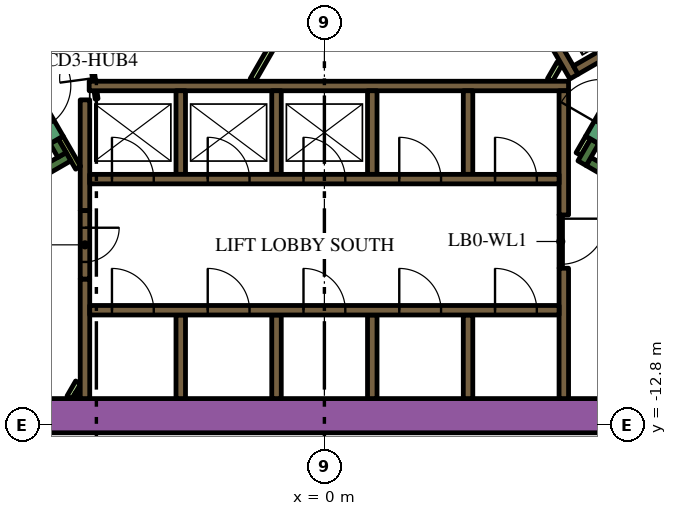
"""IFC4 building model, lengths in metres.
Left out: names, types, materials, properties, quantities, classifications, styles, units other than length and angle.
Written with IfcOpenShell. Run it as: python <this file> out.ifc"""

import sys

from ifc_helpers import new_model, si_unit, direction, frame, frame_2d, origin, place, context, subcontext, project, spatial, polyline, rectangle, outline, extrude, element, fill, save


model = new_model("IFC4")
c1 = context("Model", 3, precision=1e-05, world=origin(), true_north=direction((0.0, 1.0)))
c2 = subcontext(c1, "Body", "Model", "MODEL_VIEW")
j1 = project(units=[si_unit("LENGTHUNIT", "METRE"), si_unit("PLANEANGLEUNIT", "RADIAN")], contexts=[c1])
p1 = place(None, origin())
s1 = spatial("IfcSite", under=j1, at=p1, CompositionType="ELEMENT")
p2 = place(p1, origin())
s2 = spatial("IfcBuilding", under=s1, at=p2, CompositionType="ELEMENT")
p3 = place(p2, frame((0.0, 0.0, 134.4)))
s3 = spatial("IfcBuildingStorey", under=s2, at=p3, CompositionType="ELEMENT", Elevation=134.4)
p4 = place(p3, frame((6.776, 13.364, 0.0), z_axis=(0.0, 0.0, 1.0), x_axis=(0.500004177138, -0.8660229921, 0.0)))
e1 = element("IfcWall", 1, at=p4, inside=s3, PredefinedType="SOLIDWALL", context=c2, shape_type="SweptSolid", body=[
    extrude(rectangle(XDim=20.204, YDim=0.9, at=frame_2d((10.102, 0.0))), origin(), (0.0, 0.0, 1.0), 7.2),
])
p5 = place(p3, frame((-12.019, -12.55, 0.0), z_axis=(0.0, 0.0, 1.0), x_axis=(1.0, 0.0, 0.0)))
e2 = element("IfcWall", 2, at=p5, inside=s3, PredefinedType="SOLIDWALL", context=c2, shape_type="SweptSolid", body=[
    extrude(rectangle(XDim=21.63, YDim=0.9, at=frame_2d((10.815, 0.0))), origin(), (0.0, 0.0, 1.0), 7.2),
])
p6 = place(p3, frame((12.84, -9.261, 0.0), z_axis=(0.0, 0.0, 1.0), x_axis=(-0.866013990052, 0.500019768644, 0.0)))
e3 = element("IfcWall", 3, at=p6, inside=s3, PredefinedType="SOLIDWALL", context=c2, shape_type="SweptSolid", body=[
    extrude(rectangle(XDim=6.8, YDim=0.25, at=frame_2d((3.4, 0.0))), origin(), (0.0, 0.0, 1.0), 7.2),
])
p7 = place(p3, frame((7.113, -5.33, 0.0), z_axis=(0.0, 0.0, 1.0), x_axis=(-0.499965889992, -0.866045096311, 0.0)))
e4 = element("IfcWall", 4, at=p7, inside=s3, PredefinedType="SOLIDWALL", context=c2, shape_type="SweptSolid", body=[
    extrude(rectangle(XDim=0.666, YDim=0.25, at=frame_2d((0.333, 0.0))), origin(), (0.0, 0.0, 1.0), 7.2),
])
p8 = place(p3, frame((-12.84, -9.261, 0.0), z_axis=(0.0, 0.0, 1.0), x_axis=(0.866016039709, 0.500016218704, 0.0)))
e5 = element("IfcWall", 5, at=p8, inside=s3, PredefinedType="SOLIDWALL", context=c2, shape_type="SweptSolid", body=[
    extrude(rectangle(XDim=7.05, YDim=0.25, at=frame_2d((3.525, 0.0))), origin(), (0.0, 0.0, 1.0), 7.2),
])
p9 = place(p3, frame((-6.905, -5.69, 0.0), z_axis=(0.0, 0.0, 1.0), x_axis=(-0.499993700073, 0.866029041019, 0.0)))
e6 = element("IfcWall", 6, at=p9, inside=s3, PredefinedType="SOLIDWALL", context=c2, shape_type="SweptSolid", body=[
    extrude(rectangle(XDim=0.416, YDim=0.25, at=frame_2d((0.208, 0.0))), origin(), (0.0, 0.0, 1.0), 7.2),
])
p10 = place(p3, frame((-3.78, -12.1, 0.0), z_axis=(0.0, 0.0, 1.0), x_axis=(0.0, 1.0, 0.0)))
e7 = element("IfcWall", 7, at=p10, inside=s3, PredefinedType="SOLIDWALL", context=c2, shape_type="SweptSolid", body=[
    extrude(rectangle(XDim=2.2, YDim=0.25, at=frame_2d((1.1, 0.0))), origin(), (0.0, 0.0, 1.0), 7.2),
])
p11 = place(p3, frame((-6.3, -12.1, 0.0), z_axis=(0.0, 0.0, 1.0), x_axis=(0.0, 1.0, 0.0)))
e8 = element("IfcWall", 8, at=p11, inside=s3, PredefinedType="SOLIDWALL", context=c2, shape_type="SweptSolid", body=[
    extrude(rectangle(XDim=3.146, YDim=0.25, at=frame_2d((1.573, 0.0))), origin(), (0.0, 0.0, 1.0), 7.2),
])
p12 = place(p3, frame((-6.3, -4.24, 0.0), z_axis=(0.0, 0.0, 1.0), x_axis=(0.0, -1.0, 0.0)))
e9 = element("IfcWall", 9, at=p12, inside=s3, PredefinedType="SOLIDWALL", context=c2, shape_type="SweptSolid", body=[
    extrude(rectangle(XDim=2.914, YDim=0.25, at=frame_2d((1.457, 0.0))), origin(), (0.0, 0.0, 1.0), 7.2),
])
p13 = place(p3, frame((-6.19, -3.875, 0.0), z_axis=(0.0, 0.0, 1.0), x_axis=(1.0, 0.0, 0.0)))
e10 = element("IfcWall", 10, at=p13, inside=s3, PredefinedType="SOLIDWALL", context=c2, shape_type="SweptSolid", body=[
    extrude(rectangle(XDim=12.615, YDim=0.25, at=frame_2d((6.307, 0.0))), origin(), (0.0, 0.0, 1.0), 7.2),
])
p14 = place(p3, frame((6.3, -8.67, 0.0), z_axis=(0.0, 0.0, 1.0), x_axis=(0.0, -1.0, 0.0)))
e11 = element("IfcWall", 11, at=p14, inside=s3, PredefinedType="SOLIDWALL", context=c2, shape_type="SweptSolid", body=[
    extrude(rectangle(XDim=3.43, YDim=0.25, at=frame_2d((1.715, 0.0))), origin(), (0.0, 0.0, 1.0), 7.2),
])
p15 = place(p3, frame((6.3, -7.268, 0.0), z_axis=(0.0, 0.0, 1.0), x_axis=(0.0, 1.0, 0.0)))
e12 = element("IfcWall", 12, at=p15, inside=s3, PredefinedType="SOLIDWALL", context=c2, shape_type="SweptSolid", body=[
    extrude(rectangle(XDim=3.268, YDim=0.25, at=frame_2d((1.634, 0.0))), origin(), (0.0, 0.0, 1.0), 7.2),
])
for number, where, z_axis, x_axis in (
    (13, (3.78, -4.0, 0.0), (0.0, 0.0, 1.0), (0.0, -1.0, 0.0)),
    (14, (1.26, -4.0, 0.0), (0.0, 0.0, 1.0), (0.0, -1.0, 0.0)),
    (15, (-1.26, -4.0, 0.0), (0.0, 0.0, 1.0), (0.0, -1.0, 0.0)),
    (16, (-3.78, -4.0, 0.0), (0.0, 0.0, 1.0), (0.0, -1.0, 0.0)),
    (17, (3.78, -12.1, 0.0), (0.0, 0.0, 1.0), (0.0, 1.0, 0.0)),
    (18, (1.26, -12.1, 0.0), (0.0, 0.0, 1.0), (0.0, 1.0, 0.0)),
    (19, (-1.26, -12.1, 0.0), (0.0, 0.0, 1.0), (0.0, 1.0, 0.0)),
):
    element("IfcWall", number, at=place(p3, frame(where, z_axis=z_axis, x_axis=x_axis)), inside=s3, PredefinedType="SOLIDWALL", context=c2, shape_type="SweptSolid", body=[
        extrude(rectangle(XDim=2.2, YDim=0.25, at=frame_2d((1.1, 0.0))), origin(), (0.0, 0.0, 1.0), 7.2),
    ])
p16 = place(p3, origin())
e20 = element("IfcWall", 20, at=p16, inside=s3, PredefinedType="SOLIDWALL", context=c2, shape_type="SweptSolid", body=[
    extrude(outline(polyline([(0.335, 6.925), (0.335, 6.925), (0.335, 7.075), (0.335, 7.075), (0.335, 7.075), (0.245, 7.075), (0.035, 7.439), (0.252, 7.564), (0.377, 7.348), (1.512, 5.382), (1.637, 5.165), (2.221, 4.153), (2.771, 3.199), (2.896, 2.983), (3.138, 2.564), (4.031, 1.017), (4.156, 0.801), (5.292, -1.165), (5.417, -1.382), (6.073, -2.519), (6.552, -3.348), (6.677, -3.564), (6.46, -3.689), (0.332, 6.925), (0.335, 6.925), (0.335, 6.925)])), origin(), (0.0, 0.0, 1.0), 7.2),
])
p17 = place(p3, frame((9.352, -1.875, 0.0), z_axis=(0.0, 0.0, 1.0), x_axis=(-0.866024844342, -0.500000968981, 0.0)))
e21 = element("IfcWall", 21, at=p17, inside=s3, PredefinedType="SOLIDWALL", context=c2, shape_type="SweptSolid", body=[
    extrude(rectangle(XDim=3.162, YDim=0.25, at=frame_2d((1.581, 0.0))), origin(), (0.0, 0.0, 1.0), 7.2),
])
p18 = place(p3, frame((-6.708, -12.068, 0.0), z_axis=(0.0, 0.0, 1.0), x_axis=(0.500000789788, 0.8660249478, 0.0)))
e22 = element("IfcWall", 22, at=p18, inside=s3, PredefinedType="PARTITIONING", context=c2, shape_type="SweptSolid", body=[
    extrude(rectangle(XDim=0.456, YDim=0.15, at=frame_2d((0.228, 0.0))), origin(), (0.0, 0.0, 1.0), 6.15),
])
p19 = place(p3, frame((-6.534, -12.068, 0.0), z_axis=(0.0, 0.0, 1.0), x_axis=(0.500240224089, 0.865886665912, 0.0)))
e23 = element("IfcWall", 23, at=p19, inside=s3, PredefinedType="PARTITIONING", context=c2, shape_type="SweptSolid", body=[
    extrude(rectangle(XDim=0.109, YDim=0.15, at=frame_2d((0.054, 0.0))), origin(), (0.0, 0.0, 1.0), 6.15),
])
p20 = place(p3, frame((-6.48, -6.027, 0.0), z_axis=(0.0, 0.0, 1.0), x_axis=(-0.499936960004, 0.866061796884, 0.0)))
e24 = element("IfcWall", 24, at=p20, inside=s3, PredefinedType="PARTITIONING", context=c2, shape_type="SweptSolid", body=[
    extrude(rectangle(XDim=0.919, YDim=0.15, at=frame_2d((0.46, 0.0))), origin(), (0.0, 0.0, 1.0), 7.2),
])
p21 = place(p3, frame((-1.887, -3.718, 0.0), z_axis=(0.0, 0.0, 1.0), x_axis=(0.499842898591, 0.866116087328, 0.0)))
e25 = element("IfcWall", 25, at=p21, inside=s3, PredefinedType="PARTITIONING", context=c2, shape_type="SweptSolid", body=[
    extrude(rectangle(XDim=0.936, YDim=0.15, at=frame_2d((0.468, 0.0))), origin(), (0.0, 0.0, 1.0), 6.15),
])
p22 = place(p3, frame((6.688, -5.667, 0.0), z_axis=(0.0, 0.0, 1.0), x_axis=(0.499834152157, 0.86612113491, 0.0)))
e26 = element("IfcWall", 26, at=p22, inside=s3, PredefinedType="PARTITIONING", context=c2, shape_type="SweptSolid", body=[
    extrude(rectangle(XDim=0.505, YDim=0.15, at=frame_2d((0.252, 0.0))), origin(), (0.0, 0.0, 1.0), 6.15),
])
p23 = place(p3, frame((5.936, -3.718, 0.0), z_axis=(0.0, 0.0, 1.0), x_axis=(0.499890179513, 0.866088799389, 0.0)))
e27 = element("IfcWall", 27, at=p23, inside=s3, PredefinedType="PARTITIONING", context=c2, shape_type="SweptSolid", body=[
    extrude(rectangle(XDim=0.504, YDim=0.15, at=frame_2d((0.252, 0.0))), origin(), (0.0, 0.0, 1.0), 6.15),
])
p24 = place(p3, frame((-6.175, -9.775, 0.0), z_axis=(0.0, 0.0, 1.0), x_axis=(1.0, 0.0, 0.0)))
e28 = element("IfcWall", 28, at=p24, inside=s3, PredefinedType="SOLIDWALL", context=c2, shape_type="SweptSolid", body=[
    extrude(rectangle(XDim=12.35, YDim=0.25, at=frame_2d((6.175, 0.0))), origin(), (0.0, 0.0, 1.0), 7.2),
])
p25 = place(p24, frame((0.585, 0.0, 0.0)))
e29 = element("IfcOpeningElement", 29, at=p25, cuts=e28, PredefinedType="OPENING", context=c2, shape_type="SweptSolid", body=[
    extrude(rectangle(XDim=1.1, YDim=2.1, at=frame_2d((0.55, 1.05))), frame((0.0, 0.135, 0.0), z_axis=(0.0, -1.0, 0.0), x_axis=(1.0, 0.0, 0.0)), (0.0, 0.0, 1.0), 0.27),
])
p26 = place(p24, frame((3.105, 0.0, 0.0)))
e30 = element("IfcOpeningElement", 30, at=p26, cuts=e28, PredefinedType="OPENING", context=c2, shape_type="SweptSolid", body=[
    extrude(rectangle(XDim=1.1, YDim=2.1, at=frame_2d((0.55, 1.05))), frame((0.0, 0.135, 0.0), z_axis=(0.0, -1.0, 0.0), x_axis=(1.0, 0.0, 0.0)), (0.0, 0.0, 1.0), 0.27),
])
p27 = place(p24, frame((5.625, 0.0, 0.0)))
e31 = element("IfcOpeningElement", 31, at=p27, cuts=e28, PredefinedType="OPENING", context=c2, shape_type="SweptSolid", body=[
    extrude(rectangle(XDim=1.1, YDim=2.1, at=frame_2d((0.55, 1.05))), frame((0.0, 0.135, 0.0), z_axis=(0.0, -1.0, 0.0), x_axis=(1.0, 0.0, 0.0)), (0.0, 0.0, 1.0), 0.27),
])
p28 = place(p24, frame((8.145, 0.0, 0.0)))
e32 = element("IfcOpeningElement", 32, at=p28, cuts=e28, PredefinedType="OPENING", context=c2, shape_type="SweptSolid", body=[
    extrude(rectangle(XDim=1.1, YDim=2.1, at=frame_2d((0.55, 1.05))), frame((0.0, 0.135, 0.0), z_axis=(0.0, -1.0, 0.0), x_axis=(1.0, 0.0, 0.0)), (0.0, 0.0, 1.0), 0.27),
])
p29 = place(p24, frame((10.665, 0.0, 0.0)))
e33 = element("IfcOpeningElement", 33, at=p29, cuts=e28, PredefinedType="OPENING", context=c2, shape_type="SweptSolid", body=[
    extrude(rectangle(XDim=1.1, YDim=2.1, at=frame_2d((0.55, 1.05))), frame((0.0, 0.135, 0.0), z_axis=(0.0, -1.0, 0.0), x_axis=(1.0, 0.0, 0.0)), (0.0, 0.0, 1.0), 0.27),
])
p30 = place(p3, frame((-6.175, -6.325, 0.0), z_axis=(0.0, 0.0, 1.0), x_axis=(1.0, 0.0, 0.0)))
e34 = element("IfcWall", 34, at=p30, inside=s3, PredefinedType="SOLIDWALL", context=c2, shape_type="SweptSolid", body=[
    extrude(rectangle(XDim=12.35, YDim=0.25, at=frame_2d((6.175, 0.0))), origin(), (0.0, 0.0, 1.0), 7.2),
])
p31 = place(p30, frame((0.585, 0.0, 0.0)))
e35 = element("IfcOpeningElement", 35, at=p31, cuts=e34, PredefinedType="OPENING", context=c2, shape_type="SweptSolid", body=[
    extrude(rectangle(XDim=1.1, YDim=2.1, at=frame_2d((0.55, 1.05))), frame((0.0, 0.135, 0.0), z_axis=(0.0, -1.0, 0.0), x_axis=(1.0, 0.0, 0.0)), (0.0, 0.0, 1.0), 0.27),
])
p32 = place(p30, frame((3.105, 0.0, 0.0)))
e36 = element("IfcOpeningElement", 36, at=p32, cuts=e34, PredefinedType="OPENING", context=c2, shape_type="SweptSolid", body=[
    extrude(rectangle(XDim=1.1, YDim=2.1, at=frame_2d((0.55, 1.05))), frame((0.0, 0.135, 0.0), z_axis=(0.0, -1.0, 0.0), x_axis=(1.0, 0.0, 0.0)), (0.0, 0.0, 1.0), 0.27),
])
p33 = place(p30, frame((5.625, 0.0, 0.0)))
e37 = element("IfcOpeningElement", 37, at=p33, cuts=e34, PredefinedType="OPENING", context=c2, shape_type="SweptSolid", body=[
    extrude(rectangle(XDim=1.1, YDim=2.1, at=frame_2d((0.55, 1.05))), frame((0.0, 0.135, 0.0), z_axis=(0.0, -1.0, 0.0), x_axis=(1.0, 0.0, 0.0)), (0.0, 0.0, 1.0), 0.27),
])
p34 = place(p30, frame((8.145, 0.0, 0.0)))
e38 = element("IfcOpeningElement", 38, at=p34, cuts=e34, PredefinedType="OPENING", context=c2, shape_type="SweptSolid", body=[
    extrude(rectangle(XDim=1.1, YDim=2.1, at=frame_2d((0.55, 1.05))), frame((0.0, 0.135, 0.0), z_axis=(0.0, -1.0, 0.0), x_axis=(1.0, 0.0, 0.0)), (0.0, 0.0, 1.0), 0.27),
])
p35 = place(p30, frame((10.665, 0.0, 0.0)))
e39 = element("IfcOpeningElement", 39, at=p35, cuts=e34, PredefinedType="OPENING", context=c2, shape_type="SweptSolid", body=[
    extrude(rectangle(XDim=1.1, YDim=2.1, at=frame_2d((0.55, 1.05))), frame((0.0, 0.135, 0.0), z_axis=(0.0, -1.0, 0.0), x_axis=(1.0, 0.0, 0.0)), (0.0, 0.0, 1.0), 0.27),
])
p36 = place(p3, frame((7.048, -5.292, 0.0), z_axis=(0.0, 0.0, 1.0), x_axis=(0.49994051562, 0.866059744384, 0.0)))
e40 = element("IfcWall", 40, at=p36, inside=s3, PredefinedType="SOLIDWALL", context=c2, shape_type="SweptSolid", body=[
    extrude(rectangle(XDim=2.1, YDim=0.4, at=frame_2d((1.05, 0.0))), origin(), (0.0, 0.0, 1.0), 7.2),
])
p37 = place(p36, frame((0.45, 0.0, 0.0)))
e41 = element("IfcOpeningElement", 41, at=p37, cuts=e40, PredefinedType="OPENING", context=c2, shape_type="SweptSolid", body=[
    extrude(rectangle(XDim=1.2, YDim=2.1, at=frame_2d((0.6, 1.05))), frame((0.0, 0.21, 0.0), z_axis=(0.0, -1.0, 0.0), x_axis=(1.0, 0.0, 0.0)), (0.0, 0.0, 1.0), 0.42),
])
p38 = place(p3, frame((-8.098, -3.474, 0.0), z_axis=(0.0, 0.0, 1.0), x_axis=(0.49994051562, -0.866059744384, 0.0)))
e42 = element("IfcWall", 42, at=p38, inside=s3, PredefinedType="SOLIDWALL", context=c2, shape_type="SweptSolid", body=[
    extrude(rectangle(XDim=2.1, YDim=0.4, at=frame_2d((1.05, 0.0))), origin(), (0.0, 0.0, 1.0), 7.2),
])
p39 = place(p38, frame((0.45, 0.0, 0.0)))
e43 = element("IfcOpeningElement", 43, at=p39, cuts=e42, PredefinedType="OPENING", context=c2, shape_type="SweptSolid", body=[
    extrude(rectangle(XDim=1.2, YDim=2.1, at=frame_2d((0.6, 1.05))), frame((0.0, 0.21, 0.0), z_axis=(0.0, -1.0, 0.0), x_axis=(1.0, 0.0, 0.0)), (0.0, 0.0, 1.0), 0.42),
])
p40 = place(p3, frame((-6.3, -7.154, 0.0), z_axis=(0.0, 0.0, 1.0), x_axis=(0.0, -1.0, 0.0)))
e44 = element("IfcWall", 44, at=p40, inside=s3, PredefinedType="SOLIDWALL", context=c2, shape_type="SweptSolid", body=[
    extrude(rectangle(XDim=1.8, YDim=0.25, at=frame_2d((0.9, 0.0))), origin(), (0.0, 0.0, 1.0), 7.2),
])
p41 = place(p40, frame((0.45, 0.0, 0.0)))
e45 = element("IfcOpeningElement", 45, at=p41, cuts=e44, PredefinedType="OPENING", context=c2, shape_type="SweptSolid", body=[
    extrude(rectangle(XDim=0.9, YDim=2.1, at=frame_2d((0.45, 1.05))), frame((0.0, 0.135, 0.0), z_axis=(0.0, -1.0, 0.0), x_axis=(1.0, 0.0, 0.0)), (0.0, 0.0, 1.0), 0.27),
])
p42 = place(p3, frame((-5.995, -4.213, 0.0), z_axis=(0.0, 0.0, 1.0), x_axis=(-0.132072335448, 0.991240081014, 0.0)))
e46 = element("IfcWall", 46, at=p42, inside=s3, PredefinedType="PARTITIONING", context=c2, shape_type="SweptSolid", body=[
    extrude(rectangle(XDim=2.1, YDim=0.076, at=frame_2d((1.05, 0.0))), origin(), (0.0, 0.0, 1.0), 6.15),
])
p43 = place(p42, frame((0.55, 0.0, 0.0)))
e47 = element("IfcOpeningElement", 47, at=p43, cuts=e46, PredefinedType="OPENING", context=c2, shape_type="SweptSolid", body=[
    extrude(rectangle(XDim=0.9, YDim=2.1, at=frame_2d((0.45, 1.05))), frame((0.0, 0.048, 0.0), z_axis=(0.0, -1.0, 0.0), x_axis=(1.0, 0.0, 0.0)), (0.0, 0.0, 1.0), 0.096),
])
p44 = place(p3, frame((6.22, -7.266, 0.0), z_axis=(0.0, 0.0, 1.0), x_axis=(0.0, -1.0, 0.0)))
e48 = element("IfcWall", 48, at=p44, inside=s3, PredefinedType="PARTITIONING", context=c2, shape_type="SweptSolid", body=[
    extrude(rectangle(XDim=1.4, YDim=0.09, at=frame_2d((0.7, 0.0))), origin(), (0.0, 0.0, 1.0), 6.15),
])
p45 = place(p44, frame((0.1, 0.0, 0.0)))
e49 = element("IfcOpeningElement", 49, at=p45, cuts=e48, PredefinedType="OPENING", context=c2, shape_type="SweptSolid", body=[
    extrude(rectangle(XDim=1.2, YDim=2.1, at=frame_2d((0.6, 1.05))), frame((0.0, 0.055, 0.0), z_axis=(0.0, -1.0, 0.0), x_axis=(1.0, 0.0, 0.0)), (0.0, 0.0, 1.0), 0.11),
])
p46 = place(p25, origin())
e50 = element("IfcDoor", 50, at=p46, inside=s3, OperationType="DOUBLE_DOOR_SLIDING", PredefinedType="DOOR", context=c2, shape_type="SweptSolid", body=[
    extrude(rectangle(XDim=1.1, YDim=2.1, at=frame_2d((0.55, 1.05))), frame((0.0, 0.025, 0.0), z_axis=(0.0, -1.0, 0.0), x_axis=(1.0, 0.0, 0.0)), (0.0, 0.0, 1.0), 0.05),
])
fill(e29, e50)
p47 = place(p26, origin())
e51 = element("IfcDoor", 51, at=p47, inside=s3, OperationType="DOUBLE_DOOR_SLIDING", PredefinedType="DOOR", context=c2, shape_type="SweptSolid", body=[
    extrude(rectangle(XDim=1.1, YDim=2.1, at=frame_2d((0.55, 1.05))), frame((0.0, 0.025, 0.0), z_axis=(0.0, -1.0, 0.0), x_axis=(1.0, 0.0, 0.0)), (0.0, 0.0, 1.0), 0.05),
])
fill(e30, e51)
p48 = place(p27, origin())
e52 = element("IfcDoor", 52, at=p48, inside=s3, OperationType="DOUBLE_DOOR_SLIDING", PredefinedType="DOOR", context=c2, shape_type="SweptSolid", body=[
    extrude(rectangle(XDim=1.1, YDim=2.1, at=frame_2d((0.55, 1.05))), frame((0.0, 0.025, 0.0), z_axis=(0.0, -1.0, 0.0), x_axis=(1.0, 0.0, 0.0)), (0.0, 0.0, 1.0), 0.05),
])
fill(e31, e52)
p49 = place(p28, origin())
e53 = element("IfcDoor", 53, at=p49, inside=s3, OperationType="DOUBLE_DOOR_SLIDING", PredefinedType="DOOR", context=c2, shape_type="SweptSolid", body=[
    extrude(rectangle(XDim=1.1, YDim=2.1, at=frame_2d((0.55, 1.05))), frame((0.0, 0.025, 0.0), z_axis=(0.0, -1.0, 0.0), x_axis=(1.0, 0.0, 0.0)), (0.0, 0.0, 1.0), 0.05),
])
fill(e32, e53)
p50 = place(p29, origin())
e54 = element("IfcDoor", 54, at=p50, inside=s3, OperationType="DOUBLE_DOOR_SLIDING", PredefinedType="DOOR", context=c2, shape_type="SweptSolid", body=[
    extrude(rectangle(XDim=1.1, YDim=2.1, at=frame_2d((0.55, 1.05))), frame((0.0, 0.025, 0.0), z_axis=(0.0, -1.0, 0.0), x_axis=(1.0, 0.0, 0.0)), (0.0, 0.0, 1.0), 0.05),
])
fill(e33, e54)
p51 = place(p31, origin())
e55 = element("IfcDoor", 55, at=p51, inside=s3, OperationType="DOUBLE_DOOR_SLIDING", PredefinedType="DOOR", context=c2, shape_type="SweptSolid", body=[
    extrude(rectangle(XDim=1.1, YDim=2.1, at=frame_2d((0.55, 1.05))), frame((0.0, 0.025, 0.0), z_axis=(0.0, -1.0, 0.0), x_axis=(1.0, 0.0, 0.0)), (0.0, 0.0, 1.0), 0.05),
])
fill(e35, e55)
p52 = place(p32, origin())
e56 = element("IfcDoor", 56, at=p52, inside=s3, OperationType="DOUBLE_DOOR_SLIDING", PredefinedType="DOOR", context=c2, shape_type="SweptSolid", body=[
    extrude(rectangle(XDim=1.1, YDim=2.1, at=frame_2d((0.55, 1.05))), frame((0.0, 0.025, 0.0), z_axis=(0.0, -1.0, 0.0), x_axis=(1.0, 0.0, 0.0)), (0.0, 0.0, 1.0), 0.05),
])
fill(e36, e56)
p53 = place(p33, origin())
e57 = element("IfcDoor", 57, at=p53, inside=s3, OperationType="DOUBLE_DOOR_SLIDING", PredefinedType="DOOR", context=c2, shape_type="SweptSolid", body=[
    extrude(rectangle(XDim=1.1, YDim=2.1, at=frame_2d((0.55, 1.05))), frame((0.0, 0.025, 0.0), z_axis=(0.0, -1.0, 0.0), x_axis=(1.0, 0.0, 0.0)), (0.0, 0.0, 1.0), 0.05),
])
fill(e37, e57)
p54 = place(p34, origin())
e58 = element("IfcDoor", 58, at=p54, inside=s3, OperationType="DOUBLE_DOOR_SLIDING", PredefinedType="DOOR", context=c2, shape_type="SweptSolid", body=[
    extrude(rectangle(XDim=1.1, YDim=2.1, at=frame_2d((0.55, 1.05))), frame((0.0, 0.025, 0.0), z_axis=(0.0, -1.0, 0.0), x_axis=(1.0, 0.0, 0.0)), (0.0, 0.0, 1.0), 0.05),
])
fill(e38, e58)
p55 = place(p35, origin())
e59 = element("IfcDoor", 59, at=p55, inside=s3, OperationType="DOUBLE_DOOR_SLIDING", PredefinedType="DOOR", context=c2, shape_type="SweptSolid", body=[
    extrude(rectangle(XDim=1.1, YDim=2.1, at=frame_2d((0.55, 1.05))), frame((0.0, 0.025, 0.0), z_axis=(0.0, -1.0, 0.0), x_axis=(1.0, 0.0, 0.0)), (0.0, 0.0, 1.0), 0.05),
])
fill(e39, e59)
p56 = place(p41, origin())
e60 = element("IfcDoor", 60, at=p56, inside=s3, OperationType="SINGLE_SWING_LEFT", PredefinedType="DOOR", context=c2, shape_type="SweptSolid", body=[
    extrude(rectangle(XDim=0.9, YDim=2.1, at=frame_2d((0.45, 1.05))), frame((0.0, 0.025, 0.0), z_axis=(0.0, -1.0, 0.0), x_axis=(1.0, 0.0, 0.0)), (0.0, 0.0, 1.0), 0.05),
])
fill(e45, e60)
p57 = place(p43, origin())
e61 = element("IfcDoor", 61, at=p57, inside=s3, OperationType="SINGLE_SWING_LEFT", PredefinedType="DOOR", context=c2, shape_type="SweptSolid", body=[
    extrude(rectangle(XDim=0.9, YDim=2.1, at=frame_2d((0.45, 1.05))), frame((0.0, 0.025, 0.0), z_axis=(0.0, -1.0, 0.0), x_axis=(1.0, 0.0, 0.0)), (0.0, 0.0, 1.0), 0.05),
])
fill(e47, e61)
p58 = place(p45, origin())
e62 = element("IfcDoor", 62, at=p58, inside=s3, OperationType="SINGLE_SWING_LEFT", PredefinedType="DOOR", context=c2, shape_type="SweptSolid", body=[
    extrude(rectangle(XDim=1.2, YDim=2.1, at=frame_2d((0.6, 1.05))), frame((0.0, 0.025, 0.0), z_axis=(0.0, -1.0, 0.0), x_axis=(1.0, 0.0, 0.0)), (0.0, 0.0, 1.0), 0.05),
])
fill(e49, e62)
save(model, sys.argv[1])
